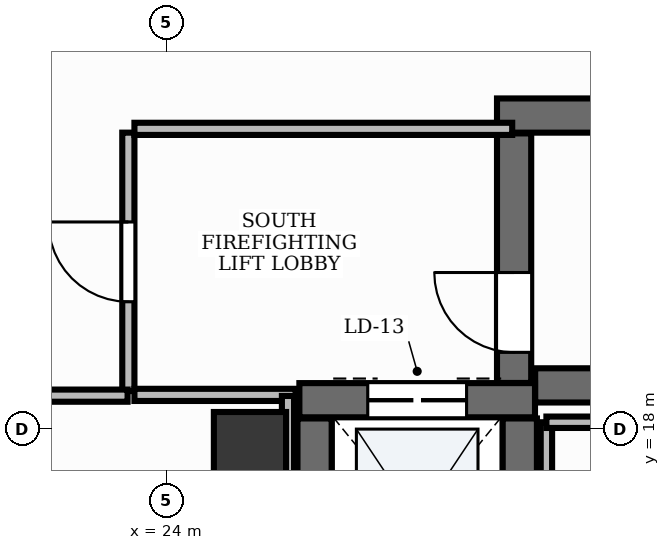
"""IFC4 building model, lengths in metres.
Left out: names, types, materials, properties, quantities, classifications, styles, units other than length and angle.
Written with IfcOpenShell. Run it as: python <this file> out.ifc"""

import sys

from ifc_helpers import new_model, si_unit, direction, frame, frame_2d, origin, origin_2d, place, context, subcontext, project, spatial, rectangle, extrude, element, fill, save


model = new_model("IFC4")
c1 = context("Model", 3, precision=1e-05, world=origin(), true_north=direction((0.0, 1.0)))
c2 = subcontext(c1, "Body", "Model", "MODEL_VIEW")
j1 = project(units=[si_unit("LENGTHUNIT", "METRE"), si_unit("PLANEANGLEUNIT", "RADIAN")], contexts=[c1])
p1 = place(None, origin())
s1 = spatial("IfcSite", under=j1, at=p1, CompositionType="ELEMENT")
p2 = place(p1, origin())
s2 = spatial("IfcBuilding", under=s1, at=p2, CompositionType="ELEMENT")
p3 = place(p2, frame((0.0, 0.0, 34.2)))
s3 = spatial("IfcBuildingStorey", under=s2, at=p3, CompositionType="ELEMENT", Elevation=34.2)
p4 = place(p3, frame((28.852, 18.575, 0.0), z_axis=(0.0, 0.0, 1.0), x_axis=(1.0, 0.0, 0.0)))
e1 = element("IfcWall", 1, at=p4, inside=s3, PredefinedType="SHEAR", context=c2, shape_type="SweptSolid", body=[
    extrude(rectangle(XDim=8.248, YDim=0.45, at=frame_2d((4.124, 0.0))), origin(), (0.0, 0.0, 1.0), 3.9),
])
p5 = place(p3, frame((28.35, 22.125, 0.0), z_axis=(0.0, 0.0, 1.0), x_axis=(1.0, 0.0, 0.0)))
e2 = element("IfcWall", 2, at=p5, inside=s3, PredefinedType="SHEAR", context=c2, shape_type="SweptSolid", body=[
    extrude(rectangle(XDim=8.75, YDim=0.45, at=frame_2d((4.375, 0.0))), origin(), (0.0, 0.0, 1.0), 3.9),
])
p6 = place(p3, frame((28.575, 18.607, 0.0), z_axis=(0.0, 0.0, 1.0), x_axis=(0.0, 1.0, 0.0)))
e3 = element("IfcWall", 3, at=p6, inside=s3, PredefinedType="SHEAR", context=c2, shape_type="SweptSolid", body=[
    extrude(rectangle(XDim=3.283, YDim=0.45, at=frame_2d((1.642, 0.0))), origin(), (0.0, 0.0, 1.0), 3.9),
])
p7 = place(p6, frame((0.403, 0.0, 0.0)))
e4 = element("IfcOpeningElement", 4, at=p7, cuts=e3, PredefinedType="OPENING", context=c2, shape_type="SweptSolid", body=[
    extrude(rectangle(XDim=1.05, YDim=2.15, at=frame_2d((0.525, 1.075))), frame((0.0, 0.24, 0.0), z_axis=(0.0, -1.0, 0.0), x_axis=(1.0, 0.0, 0.0)), (0.0, 0.0, 1.0), 0.48),
])
p8 = place(p3, frame((25.75, 18.38, 0.0), z_axis=(0.0, 0.0, 1.0), x_axis=(1.0, 0.0, 0.0)))
e5 = element("IfcWall", 5, at=p8, inside=s3, PredefinedType="SHEAR", context=c2, shape_type="SweptSolid", body=[
    extrude(rectangle(XDim=3.1, YDim=0.45, at=frame_2d((1.55, 0.0))), origin(), (0.0, 0.0, 1.0), 3.9),
])
p9 = place(p8, frame((0.9, 0.0, 0.0)))
e6 = element("IfcOpeningElement", 6, at=p9, cuts=e5, PredefinedType="OPENING", context=c2, shape_type="SweptSolid", body=[
    extrude(rectangle(XDim=1.3, YDim=2.2, at=frame_2d((0.65, 1.1))), frame((0.0, 0.24, 0.0), z_axis=(0.0, -1.0, 0.0), x_axis=(1.0, 0.0, 0.0)), (0.0, 0.0, 1.0), 0.48),
])
for number, where, z_axis, x_axis in (
    (7, (25.95, 15.44, 0.0), (0.0, 0.0, 1.0), (0.0, 1.0, 0.0)),
    (8, (28.65, 15.44, 0.0), (0.0, 0.0, 1.0), (0.0, 1.0, 0.0)),
):
    element("IfcWall", number, at=place(p3, frame(where, z_axis=z_axis, x_axis=x_axis)), inside=s3, PredefinedType="SHEAR", context=c2, shape_type="SweptSolid", body=[
        extrude(rectangle(XDim=2.7, YDim=0.45, at=frame_2d((1.35, 0.0))), origin(), (0.0, 0.0, 1.0), 3.9),
    ])
p10 = place(p3, frame((25.1, 17.75, -0.0), z_axis=(0.0, 0.0, 1.0), x_axis=(1.0, 0.0, 0.0)))
e9 = element("IfcColumn", 9, at=p10, inside=s3, PredefinedType="PILASTER", context=c2, shape_type="SweptSolid", body=[
    extrude(rectangle(XDim=0.95, YDim=0.95, at=origin_2d()), origin(), (0.0, 0.0, 1.0), 3.901),
])
p11 = place(p3, frame((23.5, 18.5, 0.0), z_axis=(0.0, 0.0, 1.0), x_axis=(0.0, 1.0, 0.0)))
e10 = element("IfcWall", 10, at=p11, inside=s3, PredefinedType="PARTITIONING", context=c2, shape_type="SweptSolid", body=[
    extrude(rectangle(XDim=3.4, YDim=0.16, at=frame_2d((1.7, 0.0))), origin(), (0.0, 0.0, 1.0), 2.91),
])
p12 = place(p11, frame((1.175, 0.0, 0.0)))
e11 = element("IfcOpeningElement", 11, at=p12, cuts=e10, PredefinedType="OPENING", context=c2, shape_type="SweptSolid", body=[
    extrude(rectangle(XDim=1.05, YDim=2.15, at=frame_2d((0.525, 1.075))), frame((0.0, 0.095, 0.0), z_axis=(0.0, -1.0, 0.0), x_axis=(1.0, 0.0, 0.0)), (0.0, 0.0, 1.0), 0.19),
])
p13 = place(p3, frame((23.58, 21.95, 0.0), z_axis=(0.0, 0.0, 1.0), x_axis=(1.0, 0.0, 0.0)))
e12 = element("IfcWall", 12, at=p13, inside=s3, PredefinedType="PARTITIONING", context=c2, shape_type="SweptSolid", body=[
    extrude(rectangle(XDim=4.97, YDim=0.16, at=frame_2d((2.485, 0.0))), origin(), (0.0, 0.0, 1.0), 2.91),
])
p14 = place(p3, frame((23.58, 18.45, 0.0), z_axis=(0.0, 0.0, 1.0), x_axis=(1.0, 0.0, 0.0)))
e13 = element("IfcWall", 13, at=p14, inside=s3, PredefinedType="PARTITIONING", context=c2, shape_type="SweptSolid", body=[
    extrude(rectangle(XDim=2.12, YDim=0.16, at=frame_2d((1.06, 0.0))), origin(), (0.0, 0.0, 1.0), 2.91),
])
p15 = place(p3, frame((17.011, 18.44, 0.0), z_axis=(0.0, 0.0, 1.0), x_axis=(1.0, 0.0, 0.0)))
e14 = element("IfcWall", 14, at=p15, inside=s3, PredefinedType="PARTITIONING", context=c2, shape_type="SweptSolid", body=[
    extrude(rectangle(XDim=6.479, YDim=0.16, at=frame_2d((3.24, 0.0))), origin(), (0.0, 0.0, 1.0), 2.91),
])
p16 = place(p15, frame((3.619, 0.0, 0.0)))
e15 = element("IfcOpeningElement", 15, at=p16, cuts=e14, PredefinedType="OPENING", context=c2, shape_type="SweptSolid", body=[
    extrude(rectangle(XDim=0.95, YDim=2.15, at=frame_2d((0.475, 1.075))), frame((0.0, 0.095, 0.0), z_axis=(0.0, -1.0, 0.0), x_axis=(1.0, 0.0, 0.0)), (0.0, 0.0, 1.0), 0.19),
])
p17 = place(p3, frame((25.6, 18.436, 0.0), z_axis=(0.0, 0.0, 1.0), x_axis=(0.0, -1.0, 0.0)))
e16 = element("IfcWall", 16, at=p17, inside=s3, PredefinedType="PARTITIONING", context=c2, shape_type="SweptSolid", body=[
    extrude(rectangle(XDim=3.482, YDim=0.16, at=frame_2d((1.741, 0.0))), origin(), (0.0, 0.0, 1.0), 2.91),
])
p18 = place(p3, frame((29.0, 14.954, 0.0), z_axis=(0.0, 0.0, 1.0), x_axis=(0.0, 1.0, 0.0)))
e17 = element("IfcWall", 17, at=p18, inside=s3, PredefinedType="PARTITIONING", context=c2, shape_type="SweptSolid", body=[
    extrude(rectangle(XDim=3.136, YDim=0.15, at=frame_2d((1.568, 0.0))), origin(), (0.0, 0.0, 1.0), 2.91),
])
p19 = place(p3, frame((29.0, 18.09, 0.0), z_axis=(0.0, 0.0, 1.0), x_axis=(1.0, 0.0, 0.0)))
e18 = element("IfcWall", 18, at=p19, inside=s3, PredefinedType="PARTITIONING", context=c2, shape_type="SweptSolid", body=[
    extrude(rectangle(XDim=8.35, YDim=0.15, at=frame_2d((4.175, 0.0))), origin(), (0.0, 0.0, 1.0), 2.91),
])
p20 = place(p7, origin())
e19 = element("IfcDoor", 19, at=p20, inside=s3, OperationType="SINGLE_SWING_RIGHT", PredefinedType="DOOR", context=c2, shape_type="SweptSolid", body=[
    extrude(rectangle(XDim=1.05, YDim=2.15, at=frame_2d((0.525, 1.075))), frame((0.0, 0.025, 0.0), z_axis=(0.0, -1.0, 0.0), x_axis=(1.0, 0.0, 0.0)), (0.0, 0.0, 1.0), 0.05),
])
fill(e4, e19)
p21 = place(p9, origin())
e20 = element("IfcDoor", 20, at=p21, inside=s3, OperationType="DOUBLE_DOOR_SLIDING", PredefinedType="DOOR", context=c2, shape_type="SweptSolid", body=[
    extrude(rectangle(XDim=1.3, YDim=2.2, at=frame_2d((0.65, 1.1))), frame((0.0, 0.025, 0.0), z_axis=(0.0, -1.0, 0.0), x_axis=(1.0, 0.0, 0.0)), (0.0, 0.0, 1.0), 0.05),
])
fill(e6, e20)
p22 = place(p12, origin())
e21 = element("IfcDoor", 21, at=p22, inside=s3, OperationType="SINGLE_SWING_RIGHT", PredefinedType="DOOR", context=c2, shape_type="SweptSolid", body=[
    extrude(rectangle(XDim=1.05, YDim=2.15, at=frame_2d((0.525, 1.075))), frame((0.0, 0.025, 0.0), z_axis=(0.0, -1.0, 0.0), x_axis=(1.0, 0.0, 0.0)), (0.0, 0.0, 1.0), 0.05),
])
fill(e11, e21)
save(model, sys.argv[1])
